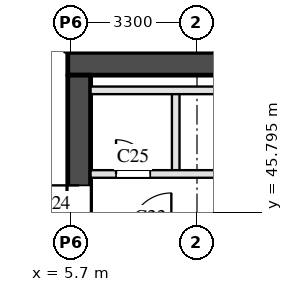
"""IFC4 building model, lengths in metres.
Left out: names, types, materials, properties, quantities, classifications, styles, units other than length and angle.
Written with IfcOpenShell. Run it as: python <this file> out.ifc"""

import sys

from ifc_helpers import new_model, si_unit, direction, frame, frame_2d, origin, place, context, subcontext, project, spatial, rectangle, extrude, element, fill, save


model = new_model("IFC4")
c1 = context("Model", 3, precision=1e-05, world=origin(), true_north=direction((0.0, 1.0)))
c2 = subcontext(c1, "Body", "Model", "MODEL_VIEW")
j1 = project(units=[si_unit("LENGTHUNIT", "METRE"), si_unit("PLANEANGLEUNIT", "RADIAN")], contexts=[c1])
p1 = place(None, origin())
s1 = spatial("IfcSite", under=j1, at=p1, CompositionType="ELEMENT")
p2 = place(p1, origin())
s2 = spatial("IfcBuilding", under=s1, at=p2, CompositionType="ELEMENT")
p3 = place(p2, frame((0.0, 0.0, 21.0)))
s3 = spatial("IfcBuildingStorey", under=s2, at=p3, CompositionType="ELEMENT", Elevation=21.0)
p4 = place(p3, frame((5.6, 49.7, 0.0), z_axis=(0.0, 0.0, 1.0), x_axis=(1.0, 0.0, 0.0)))
e1 = element("IfcWall", 1, at=p4, inside=s3, PredefinedType="SHEAR", context=c2, shape_type="SweptSolid", body=[
    extrude(rectangle(XDim=12.4, YDim=0.6, at=frame_2d((6.2, 0.0))), origin(), (0.0, 0.0, 1.0), 4.55),
])
p5 = place(p3, frame((5.9, 29.1, 0.0), z_axis=(0.0, 0.0, 1.0), x_axis=(0.0, 1.0, 0.0)))
e2 = element("IfcWall", 2, at=p5, inside=s3, PredefinedType="SHEAR", context=c2, shape_type="SweptSolid", body=[
    extrude(rectangle(XDim=20.3, YDim=0.6, at=frame_2d((10.15, 0.0))), origin(), (0.0, 0.0, 1.0), 4.55),
])
p6 = place(p5, frame((3.6, 0.0, 0.0)))
e3 = element("IfcOpeningElement", 3, at=p6, cuts=e2, PredefinedType="OPENING", context=c2, shape_type="SweptSolid", body=[
    extrude(rectangle(XDim=1.8, YDim=2.1, at=frame_2d((0.9, 1.05))), frame((0.0, 0.31, 0.0), z_axis=(0.0, -1.0, 0.0), x_axis=(1.0, 0.0, 0.0)), (0.0, 0.0, 1.0), 0.62),
])
p7 = place(p5, frame((16.4, 0.0, 0.0)))
e4 = element("IfcOpeningElement", 4, at=p7, cuts=e2, PredefinedType="OPENING", context=c2, shape_type="SweptSolid", body=[
    extrude(rectangle(XDim=1.0, YDim=2.1, at=frame_2d((0.5, 1.05))), frame((0.0, 0.31, 0.0), z_axis=(0.0, -1.0, 0.0), x_axis=(1.0, 0.0, 0.0)), (0.0, 0.0, 1.0), 0.62),
])
p8 = place(p3, frame((8.44, 46.8, 0.0), z_axis=(0.0, 0.0, 1.0), x_axis=(0.0, 1.0, 0.0)))
e5 = element("IfcWall", 5, at=p8, inside=s3, PredefinedType="PARTITIONING", context=c2, shape_type="SweptSolid", body=[
    extrude(rectangle(XDim=2.2, YDim=0.2, at=frame_2d((1.1, 0.0))), origin(), (0.0, 0.0, 1.0), 4.55),
])
p9 = place(p3, frame((6.2, 46.8, 0.0), z_axis=(0.0, 0.0, 1.0), x_axis=(1.0, 0.0, 0.0)))
e6 = element("IfcWall", 6, at=p9, inside=s3, PredefinedType="PARTITIONING", context=c2, shape_type="SweptSolid", body=[
    extrude(rectangle(XDim=11.2, YDim=0.2, at=frame_2d((5.6, 0.0))), origin(), (0.0, 0.0, 1.0), 4.55),
])
p10 = place(p9, frame((0.67, 0.0, 0.0)))
e7 = element("IfcOpeningElement", 7, at=p10, cuts=e6, PredefinedType="OPENING", context=c2, shape_type="SweptSolid", body=[
    extrude(rectangle(XDim=0.9, YDim=2.1, at=frame_2d((0.45, 1.05))), frame((0.0, 0.11, 0.0), z_axis=(0.0, -1.0, 0.0), x_axis=(1.0, 0.0, 0.0)), (0.0, 0.0, 1.0), 0.22),
])
p11 = place(p9, frame((6.27, 0.0, 0.0)))
e8 = element("IfcOpeningElement", 8, at=p11, cuts=e6, PredefinedType="OPENING", context=c2, shape_type="SweptSolid", body=[
    extrude(rectangle(XDim=0.9, YDim=2.1, at=frame_2d((0.45, 1.05))), frame((0.0, 0.11, 0.0), z_axis=(0.0, -1.0, 0.0), x_axis=(1.0, 0.0, 0.0)), (0.0, 0.0, 1.0), 0.22),
])
p12 = place(p3, frame((6.2, 49.0, 0.0), z_axis=(0.0, 0.0, 1.0), x_axis=(1.0, 0.0, 0.0)))
e9 = element("IfcWall", 9, at=p12, inside=s3, PredefinedType="PARTITIONING", context=c2, shape_type="SweptSolid", body=[
    extrude(rectangle(XDim=11.2, YDim=0.2, at=frame_2d((5.6, 0.0))), origin(), (0.0, 0.0, 1.0), 4.55),
])
p13 = place(p7, origin())
e10 = element("IfcDoor", 10, at=p13, inside=s3, OperationType="SINGLE_SWING_RIGHT", PredefinedType="DOOR", context=c2, shape_type="SweptSolid", body=[
    extrude(rectangle(XDim=1.0, YDim=2.1, at=frame_2d((0.5, 1.05))), frame((0.0, 0.025, 0.0), z_axis=(0.0, -1.0, 0.0), x_axis=(1.0, 0.0, 0.0)), (0.0, 0.0, 1.0), 0.05),
])
fill(e4, e10)
p14 = place(p10, origin())
e11 = element("IfcDoor", 11, at=p14, inside=s3, OperationType="SINGLE_SWING_LEFT", PredefinedType="DOOR", context=c2, shape_type="SweptSolid", body=[
    extrude(rectangle(XDim=0.9, YDim=2.1, at=frame_2d((0.45, 1.05))), frame((0.0, 0.025, 0.0), z_axis=(0.0, -1.0, 0.0), x_axis=(1.0, 0.0, 0.0)), (0.0, 0.0, 1.0), 0.05),
])
fill(e7, e11)
save(model, sys.argv[1])
